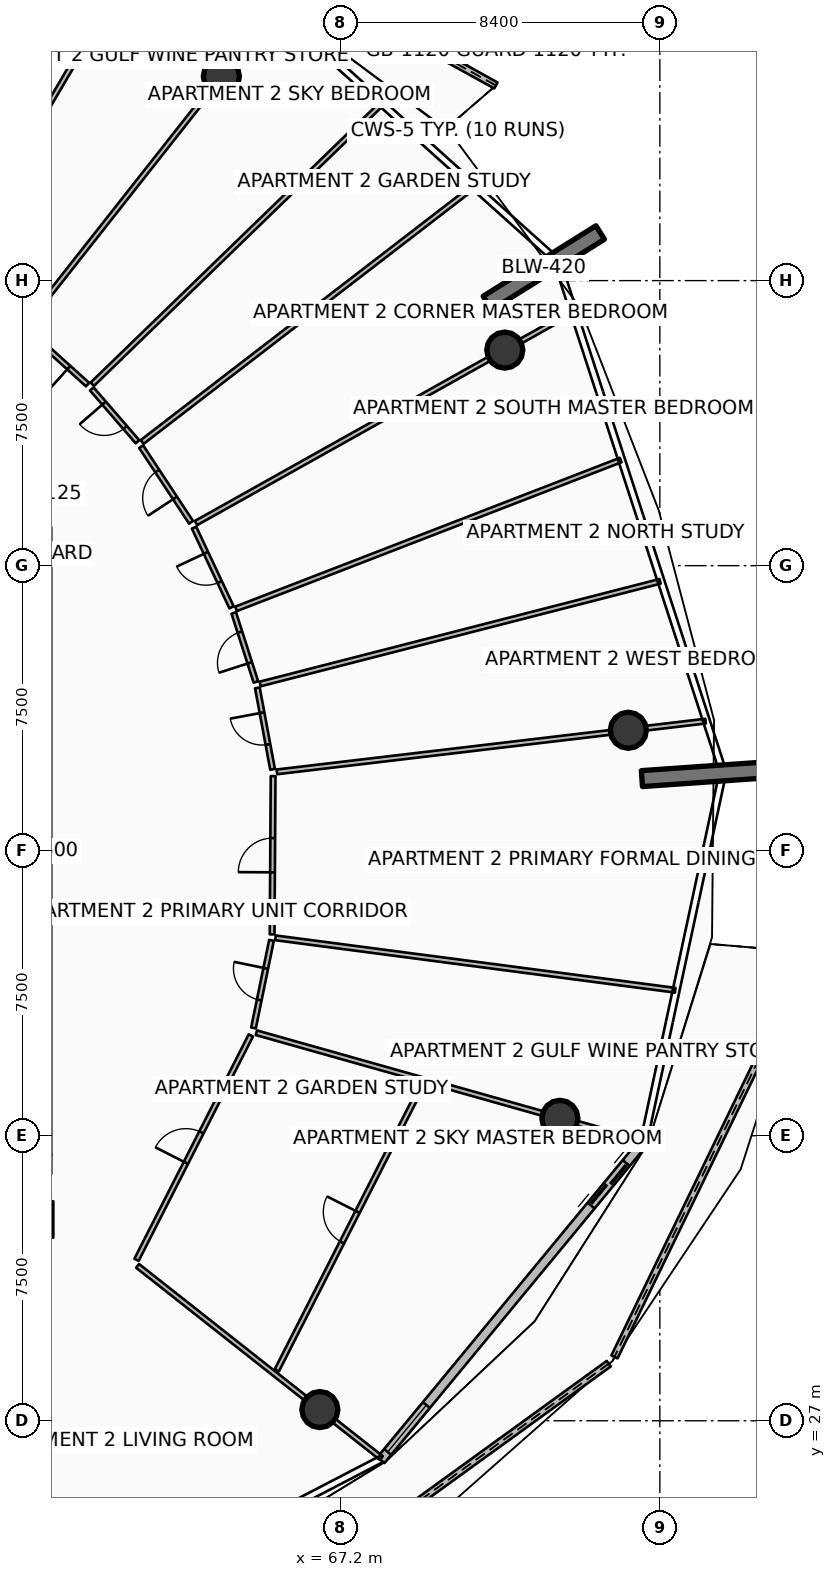
"""IFC4 building model, lengths in metres.
Left out: names, types, materials, properties, quantities, classifications, styles, units other than length and angle.
Written with IfcOpenShell. Run it as: python <this file> out.ifc"""

import sys

from ifc_helpers import new_model, si_unit, direction, frame, frame_2d, origin, origin_2d, place, context, subcontext, project, spatial, polyline, rectangle, circle, outline, extrude, element, fill, save


model = new_model("IFC4")
c1 = context("Model", 3, precision=1e-05, world=origin(), true_north=direction((0.0, 1.0)))
c2 = subcontext(c1, "Body", "Model", "MODEL_VIEW")
j1 = project(units=[si_unit("LENGTHUNIT", "METRE"), si_unit("PLANEANGLEUNIT", "RADIAN")], contexts=[c1])
p1 = place(None, origin())
s1 = spatial("IfcSite", under=j1, at=p1, CompositionType="ELEMENT")
p2 = place(p1, origin())
s2 = spatial("IfcBuilding", under=s1, at=p2, CompositionType="ELEMENT")
p3 = place(p2, frame((0.0, 0.0, 306.0)))
s3 = spatial("IfcBuildingStorey", under=s2, at=p3, CompositionType="ELEMENT", Elevation=306.0)
for number, where, z_axis, x_axis in (
    (1, (71.062, 56.411, 0.0), (0.0, 0.0, 1.0), (0.848, 0.53, 0.0)),
    (2, (75.128, 43.897, 0.0), (0.0, 0.0, 1.0), (0.998, 0.07, 0.0)),
):
    element("IfcWall", number, at=place(p3, frame(where, z_axis=z_axis, x_axis=x_axis)), inside=s3, PredefinedType="SOLIDWALL", context=c2, shape_type="SweptSolid", body=[
        extrude(rectangle(XDim=3.5, YDim=0.42, at=frame_2d((1.75, 0.0))), origin(), (0.0, 0.0, 1.0), 3.85),
    ])
p4 = place(p3, frame((71.52, 55.172, 0.0), z_axis=(-0.310266678736, -0.173751985726, 0.934636204907), x_axis=(0.488609032596, -0.872502844274, 0.0)))
e3 = element("IfcColumn", 3, at=p4, inside=s3, PredefinedType="COLUMN", context=c2, shape_type="SweptSolid", body=[
    extrude(circle(Radius=0.475, at=origin_2d()), origin(), (0.0, 0.0, 1.0), 3.691),
])
p5 = place(p3, frame((64.062, 62.374, 0.0), z_axis=(-0.212903289351, -0.270116064673, 0.938993876971), x_axis=(0.785372123188, -0.619023931782, 0.0)))
e4 = element("IfcColumn", 4, at=p5, inside=s3, PredefinedType="COLUMN", context=c2, shape_type="SweptSolid", body=[
    extrude(circle(Radius=0.475, at=origin_2d()), origin(), (0.0, 0.0, 1.0), 3.674),
])
p6 = place(p3, frame((66.654, 27.295, 0.0), z_axis=(-0.249725028878, 0.196787616792, 0.948109721408), x_axis=(-0.618939298338, -0.785438823189, 0.0)))
e5 = element("IfcColumn", 5, at=p6, inside=s3, PredefinedType="COLUMN", context=c2, shape_type="SweptSolid", body=[
    extrude(circle(Radius=0.475, at=origin_2d()), origin(), (0.0, 0.0, 1.0), 3.639),
])
p7 = place(p3, frame((72.97, 34.958, 0.0), z_axis=(-0.330987533093, 0.093362273438, 0.939005185734), x_axis=(-0.271478522348, -0.96244449809, 0.0)))
e6 = element("IfcColumn", 6, at=p7, inside=s3, PredefinedType="COLUMN", context=c2, shape_type="SweptSolid", body=[
    extrude(circle(Radius=0.475, at=origin_2d()), origin(), (0.0, 0.0, 1.0), 3.674),
])
p8 = place(p3, frame((74.77, 45.168, 0.0), z_axis=(-0.353185583697, -0.041800241366, 0.934619004349), x_axis=(0.117531776266, -0.993069122251, 0.0)))
e7 = element("IfcColumn", 7, at=p8, inside=s3, PredefinedType="COLUMN", context=c2, shape_type="SweptSolid", body=[
    extrude(circle(Radius=0.475, at=origin_2d()), origin(), (0.0, 0.0, 1.0), 3.691),
])
p9 = place(p3, frame((71.286, 62.135, 0.0), z_axis=(0.0, 0.0, 1.0), x_axis=(-0.87546271408, 0.483285667339, 0.0)))
e8 = element("IfcWall", 8, at=p9, inside=s3, PredefinedType="PARAPET", context=c2, shape_type="SweptSolid", body=[
    extrude(outline(polyline([(0.0, 0.0), (11.493, 0.0), (11.493, 1.148), (5.747, 1.127), (0.0, 1.224), (0.0, 0.0)])), frame((0.0, 0.09, 0.0), z_axis=(0.0, -1.0, 0.0), x_axis=(1.0, 0.0, 0.0)), (0.0, 0.0, 1.0), 0.18),
])
p10 = place(p3, frame((65.286, 22.009, 0.0), z_axis=(0.0, 0.0, 1.0), x_axis=(0.810034567594, 0.586382127374, 0.0)))
e9 = element("IfcWall", 9, at=p10, inside=s3, PredefinedType="PARAPET", context=c2, shape_type="SweptSolid", body=[
    extrude(outline(polyline([(0.0, 0.0), (11.073, 0.0), (11.073, 1.632), (5.537, 1.418), (0.0, 1.233), (0.0, 0.0)])), frame((0.0, 0.09, 0.0), z_axis=(0.0, -1.0, 0.0), x_axis=(1.0, 0.0, 0.0)), (0.0, 0.0, 1.0), 0.18),
])
p11 = place(p3, frame((74.406, 28.68, 0.0), z_axis=(0.0, 0.0, 1.0), x_axis=(0.436271986989, 0.899814843936, 0.0)))
e10 = element("IfcWall", 10, at=p11, inside=s3, PredefinedType="PARAPET", context=c2, shape_type="SweptSolid", body=[
    extrude(outline(polyline([(0.0, 0.0), (11.826, 0.0), (11.826, 1.86), (5.913, 1.798), (0.0, 1.632), (0.0, 0.0)])), frame((0.0, 0.09, 0.0), z_axis=(0.0, -1.0, 0.0), x_axis=(1.0, 0.0, 0.0)), (0.0, 0.0, 1.0), 0.18),
])
p12 = place(p3, frame((68.26, 25.964, 0.0), z_axis=(0.0, 0.0, 1.0), x_axis=(0.636725835274, 0.771090274024, 0.0)))
e11 = element("IfcWall", 11, at=p12, inside=s3, PredefinedType="SOLIDWALL", context=c2, shape_type="SweptSolid", body=[
    extrude(rectangle(XDim=10.907, YDim=0.24, at=frame_2d((5.454, 0.0))), origin(), (0.0, 0.0, 1.0), 2.4),
])
p13 = place(p12, frame((8.687, 0.0, 0.0)))
e12 = element("IfcOpeningElement", 12, at=p13, cuts=e11, PredefinedType="OPENING", context=c2, shape_type="SweptSolid", body=[
    extrude(rectangle(XDim=1.45, YDim=2.15, at=frame_2d((0.725, 1.075))), frame((0.0, 0.13, 0.0), z_axis=(0.0, -1.0, 0.0), x_axis=(1.0, 0.0, 0.0)), (0.0, 0.0, 1.0), 0.26),
])
p14 = place(p12, frame((0.28, 0.0, 0.65)))
e13 = element("IfcOpeningElement", 13, at=p14, cuts=e11, PredefinedType="OPENING", context=c2, shape_type="SweptSolid", body=[
    extrude(rectangle(XDim=1.6, YDim=1.5, at=frame_2d((0.8, 0.75))), frame((0.0, 0.13, 0.0), z_axis=(0.0, -1.0, 0.0), x_axis=(1.0, 0.0, 0.0)), (0.0, 0.0, 1.0), 0.26),
])
p15 = place(p3, frame((59.55, 31.82, 0.0), z_axis=(0.0, 0.0, 1.0), x_axis=(0.0, 1.0, 0.0)))
e14 = element("IfcWall", 14, at=p15, inside=s3, PredefinedType="PARTITIONING", context=c2, shape_type="SweptSolid", body=[
    extrude(rectangle(XDim=0.955, YDim=0.18, at=frame_2d((0.477, 0.0))), origin(), (0.0, 0.0, 1.0), 2.407),
])
p16 = place(p3, frame((61.858, 31.075, 0.0), z_axis=(0.0, 0.0, 1.0), x_axis=(0.785321699218, -0.619087900655, 0.0)))
e15 = element("IfcWall", 15, at=p16, inside=s3, PredefinedType="PARTITIONING", context=c2, shape_type="SweptSolid", body=[
    extrude(rectangle(XDim=8.169, YDim=0.125, at=frame_2d((4.084, 0.0))), origin(), (0.0, 0.0, 1.0), 2.407),
])
p17 = place(p3, frame((61.829, 31.235, 0.0), z_axis=(0.0, 0.0, 1.0), x_axis=(0.453994771894, 0.891004347404, 0.0)))
e16 = element("IfcWall", 16, at=p17, inside=s3, PredefinedType="PARTITIONING", context=c2, shape_type="SweptSolid", body=[
    extrude(rectangle(XDim=6.626, YDim=0.125, at=frame_2d((3.313, 0.0))), origin(), (0.0, 0.0, 1.0), 2.407),
])
p18 = place(p17, frame((2.863, 0.0, 0.0)))
e17 = element("IfcOpeningElement", 17, at=p18, cuts=e16, PredefinedType="OPENING", context=c2, shape_type="SweptSolid", body=[
    extrude(rectangle(XDim=0.9, YDim=2.08, at=frame_2d((0.45, 1.04))), frame((0.0, 0.073, 0.0), z_axis=(0.0, -1.0, 0.0), x_axis=(1.0, 0.0, 0.0)), (0.0, 0.0, 1.0), 0.145),
])
p19 = place(p3, frame((65.52, 28.326, 0.0), z_axis=(0.0, 0.0, 1.0), x_axis=(0.453999703912, 0.891001834368, 0.0)))
e18 = element("IfcWall", 18, at=p19, inside=s3, PredefinedType="PARTITIONING", context=c2, shape_type="SweptSolid", body=[
    extrude(rectangle(XDim=8.46, YDim=0.125, at=frame_2d((4.23, 0.0))), origin(), (0.0, 0.0, 1.0), 2.407),
])
p20 = place(p19, frame((3.78, 0.0, 0.0)))
e19 = element("IfcOpeningElement", 19, at=p20, cuts=e18, PredefinedType="OPENING", context=c2, shape_type="SweptSolid", body=[
    extrude(rectangle(XDim=0.9, YDim=2.08, at=frame_2d((0.45, 1.04))), frame((0.0, 0.073, 0.0), z_axis=(0.0, -1.0, 0.0), x_axis=(1.0, 0.0, 0.0)), (0.0, 0.0, 1.0), 0.145),
])
p21 = place(p3, frame((64.983, 37.21, 0.0), z_axis=(0.0, 0.0, 1.0), x_axis=(0.962454365365, -0.271443538495, 0.0)))
e20 = element("IfcWall", 20, at=p21, inside=s3, PredefinedType="PARTITIONING", context=c2, shape_type="SweptSolid", body=[
    extrude(rectangle(XDim=10.463, YDim=0.125, at=frame_2d((5.231, 0.0))), origin(), (0.0, 0.0, 1.0), 2.407),
])
p22 = place(p3, frame((65.486, 39.707, 0.0), z_axis=(0.0, 0.0, 1.0), x_axis=(0.991512400403, -0.130012152686, 0.0)))
e21 = element("IfcWall", 21, at=p22, inside=s3, PredefinedType="PARTITIONING", context=c2, shape_type="SweptSolid", body=[
    extrude(rectangle(XDim=10.608, YDim=0.125, at=frame_2d((5.304, 0.0))), origin(), (0.0, 0.0, 1.0), 2.425),
])
p23 = place(p3, frame((64.907, 37.335, 0.0), z_axis=(0.0, 0.0, 1.0), x_axis=(0.201360200042, 0.979517263676, 0.0)))
e22 = element("IfcWall", 22, at=p23, inside=s3, PredefinedType="PARTITIONING", context=c2, shape_type="SweptSolid", body=[
    extrude(rectangle(XDim=2.353, YDim=0.125, at=frame_2d((1.177, 0.0))), origin(), (0.0, 0.0, 1.0), 2.407),
])
p24 = place(p23, frame((0.752, 0.0, 0.0)))
e23 = element("IfcOpeningElement", 23, at=p24, cuts=e22, PredefinedType="OPENING", context=c2, shape_type="SweptSolid", body=[
    extrude(rectangle(XDim=0.85, YDim=2.06, at=frame_2d((0.425, 1.03))), frame((0.0, 0.073, 0.0), z_axis=(0.0, -1.0, 0.0), x_axis=(1.0, 0.0, 0.0)), (0.0, 0.0, 1.0), 0.145),
])
p25 = place(p3, frame((65.398, 39.799, 0.0), z_axis=(0.0, 0.0, 1.0), x_axis=(0.006274064384, 0.999980317864, 0.0)))
e24 = element("IfcWall", 24, at=p25, inside=s3, PredefinedType="PARTITIONING", context=c2, shape_type="SweptSolid", body=[
    extrude(rectangle(XDim=4.164, YDim=0.125, at=frame_2d((2.082, 0.0))), origin(), (0.0, 0.0, 1.0), 2.407),
])
p26 = place(p25, frame((1.632, 0.0, 0.0)))
e25 = element("IfcOpeningElement", 25, at=p26, cuts=e24, PredefinedType="OPENING", context=c2, shape_type="SweptSolid", body=[
    extrude(rectangle(XDim=0.9, YDim=2.08, at=frame_2d((0.45, 1.04))), frame((0.0, 0.073, 0.0), z_axis=(0.0, -1.0, 0.0), x_axis=(1.0, 0.0, 0.0)), (0.0, 0.0, 1.0), 0.145),
])
p27 = place(p3, frame((65.524, 44.074, 0.0), z_axis=(0.0, 0.0, 1.0), x_axis=(0.993068783977, 0.117534634433, 0.0)))
e26 = element("IfcWall", 26, at=p27, inside=s3, PredefinedType="PARTITIONING", context=c2, shape_type="SweptSolid", body=[
    extrude(rectangle(XDim=11.358, YDim=0.125, at=frame_2d((5.679, 0.0))), origin(), (0.0, 0.0, 1.0), 2.407),
])
p28 = place(p3, frame((65.082, 46.386, 0.0), z_axis=(0.0, 0.0, 1.0), x_axis=(0.968583288046, 0.248689392855, 0.0)))
e27 = element("IfcWall", 27, at=p28, inside=s3, PredefinedType="PARTITIONING", context=c2, shape_type="SweptSolid", body=[
    extrude(rectangle(XDim=10.866, YDim=0.125, at=frame_2d((5.433, 0.0))), origin(), (0.0, 0.0, 1.0), 2.425),
])
p29 = place(p3, frame((64.448, 48.363, 0.0), z_axis=(0.0, 0.0, 1.0), x_axis=(0.932639410658, 0.360809824822, 0.0)))
e28 = element("IfcWall", 28, at=p29, inside=s3, PredefinedType="PARTITIONING", context=c2, shape_type="SweptSolid", body=[
    extrude(rectangle(XDim=10.854, YDim=0.125, at=frame_2d((5.427, 0.0))), origin(), (0.0, 0.0, 1.0), 2.425),
])
p30 = place(p3, frame((65.41, 44.141, 0.0), z_axis=(0.0, 0.0, 1.0), x_axis=(-0.183463941639, 0.983026440193, 0.0)))
e29 = element("IfcWall", 29, at=p30, inside=s3, PredefinedType="PARTITIONING", context=c2, shape_type="SweptSolid", body=[
    extrude(rectangle(XDim=2.181, YDim=0.125, at=frame_2d((1.091, 0.0))), origin(), (0.0, 0.0, 1.0), 2.407),
])
p31 = place(p30, frame((0.666, 0.0, 0.0)))
e30 = element("IfcOpeningElement", 30, at=p31, cuts=e29, PredefinedType="OPENING", context=c2, shape_type="SweptSolid", body=[
    extrude(rectangle(XDim=0.85, YDim=2.06, at=frame_2d((0.425, 1.03))), frame((0.0, 0.073, 0.0), z_axis=(0.0, -1.0, 0.0), x_axis=(1.0, 0.0, 0.0)), (0.0, 0.0, 1.0), 0.145),
])
p32 = place(p3, frame((64.97, 46.44, 0.0), z_axis=(0.0, 0.0, 1.0), x_axis=(-0.305370578234, 0.952233590013, 0.0)))
e31 = element("IfcWall", 31, at=p32, inside=s3, PredefinedType="PARTITIONING", context=c2, shape_type="SweptSolid", body=[
    extrude(rectangle(XDim=1.906, YDim=0.125, at=frame_2d((0.953, 0.0))), origin(), (0.0, 0.0, 1.0), 2.89),
])
p33 = place(p32, frame((0.528, 0.0, 0.0)))
e32 = element("IfcOpeningElement", 32, at=p33, cuts=e31, PredefinedType="OPENING", context=c2, shape_type="SweptSolid", body=[
    extrude(rectangle(XDim=0.85, YDim=2.06, at=frame_2d((0.425, 1.03))), frame((0.0, 0.073, 0.0), z_axis=(0.0, -1.0, 0.0), x_axis=(1.0, 0.0, 0.0)), (0.0, 0.0, 1.0), 0.145),
])
p34 = place(p3, frame((64.33, 48.403, 0.0), z_axis=(0.0, 0.0, 1.0), x_axis=(-0.425771678031, 0.904830635084, 0.0)))
e33 = element("IfcWall", 33, at=p34, inside=s3, PredefinedType="PARTITIONING", context=c2, shape_type="SweptSolid", body=[
    extrude(rectangle(XDim=2.318, YDim=0.125, at=frame_2d((1.159, 0.0))), origin(), (0.0, 0.0, 1.0), 2.407),
])
p35 = place(p34, frame((0.734, 0.0, 0.0)))
e34 = element("IfcOpeningElement", 34, at=p35, cuts=e33, PredefinedType="OPENING", context=c2, shape_type="SweptSolid", body=[
    extrude(rectangle(XDim=0.85, YDim=2.06, at=frame_2d((0.425, 1.03))), frame((0.0, 0.073, 0.0), z_axis=(0.0, -1.0, 0.0), x_axis=(1.0, 0.0, 0.0)), (0.0, 0.0, 1.0), 0.145),
])
p36 = place(p3, frame((63.396, 50.622, 0.0), z_axis=(0.0, 0.0, 1.0), x_axis=(0.8724964858, 0.488620386667, 0.0)))
e35 = element("IfcWall", 35, at=p36, inside=s3, PredefinedType="PARTITIONING", context=c2, shape_type="SweptSolid", body=[
    extrude(rectangle(XDim=11.358, YDim=0.125, at=frame_2d((5.679, 0.0))), origin(), (0.0, 0.0, 1.0), 2.407),
])
p37 = place(p3, frame((61.978, 52.754, 0.0), z_axis=(0.0, 0.0, 1.0), x_axis=(0.792557966204, 0.609796581005, 0.0)))
e36 = element("IfcWall", 36, at=p37, inside=s3, PredefinedType="PARTITIONING", context=c2, shape_type="SweptSolid", body=[
    extrude(rectangle(XDim=10.998, YDim=0.125, at=frame_2d((5.499, 0.0))), origin(), (0.0, 0.0, 1.0), 2.425),
])
p38 = place(p3, frame((60.665, 54.273, 0.0), z_axis=(0.0, 0.0, 1.0), x_axis=(0.718137190606, 0.695901555874, 0.0)))
e37 = element("IfcWall", 37, at=p38, inside=s3, PredefinedType="PARTITIONING", context=c2, shape_type="SweptSolid", body=[
    extrude(rectangle(XDim=10.584, YDim=0.125, at=frame_2d((5.292, 0.0))), origin(), (0.0, 0.0, 1.0), 2.425),
])
p39 = place(p3, frame((63.265, 50.64, 0.0), z_axis=(0.0, 0.0, 1.0), x_axis=(-0.550634170063, 0.834746674602, 0.0)))
e38 = element("IfcWall", 38, at=p39, inside=s3, PredefinedType="PARTITIONING", context=c2, shape_type="SweptSolid", body=[
    extrude(rectangle(XDim=2.387, YDim=0.125, at=frame_2d((1.194, 0.0))), origin(), (0.0, 0.0, 1.0), 2.407),
])
p40 = place(p39, frame((0.769, 0.0, 0.0)))
e39 = element("IfcOpeningElement", 39, at=p40, cuts=e38, PredefinedType="OPENING", context=c2, shape_type="SweptSolid", body=[
    extrude(rectangle(XDim=0.85, YDim=2.06, at=frame_2d((0.425, 1.03))), frame((0.0, 0.073, 0.0), z_axis=(0.0, -1.0, 0.0), x_axis=(1.0, 0.0, 0.0)), (0.0, 0.0, 1.0), 0.145),
])
p41 = place(p3, frame((61.854, 52.76, 0.0), z_axis=(0.0, 0.0, 1.0), x_axis=(-0.653948493608, 0.756539072162, 0.0)))
e40 = element("IfcWall", 40, at=p41, inside=s3, PredefinedType="PARTITIONING", context=c2, shape_type="SweptSolid", body=[
    extrude(rectangle(XDim=1.837, YDim=0.125, at=frame_2d((0.918, 0.0))), origin(), (0.0, 0.0, 1.0), 2.89),
])
p42 = place(p41, frame((0.494, 0.0, 0.0)))
e41 = element("IfcOpeningElement", 41, at=p42, cuts=e40, PredefinedType="OPENING", context=c2, shape_type="SweptSolid", body=[
    extrude(rectangle(XDim=0.85, YDim=2.06, at=frame_2d((0.425, 1.03))), frame((0.0, 0.073, 0.0), z_axis=(0.0, -1.0, 0.0), x_axis=(1.0, 0.0, 0.0)), (0.0, 0.0, 1.0), 0.145),
])
p43 = place(p3, frame((60.541, 54.264, 0.0), z_axis=(0.0, 0.0, 1.0), x_axis=(-0.742235558018, 0.670139072443, 0.0)))
e42 = element("IfcWall", 42, at=p43, inside=s3, PredefinedType="PARTITIONING", context=c2, shape_type="SweptSolid", body=[
    extrude(rectangle(XDim=2.181, YDim=0.125, at=frame_2d((1.09, 0.0))), origin(), (0.0, 0.0, 1.0), 2.407),
])
p44 = place(p43, frame((0.666, 0.0, 0.0)))
e43 = element("IfcOpeningElement", 43, at=p44, cuts=e42, PredefinedType="OPENING", context=c2, shape_type="SweptSolid", body=[
    extrude(rectangle(XDim=0.85, YDim=2.06, at=frame_2d((0.425, 1.03))), frame((0.0, 0.073, 0.0), z_axis=(0.0, -1.0, 0.0), x_axis=(1.0, 0.0, 0.0)), (0.0, 0.0, 1.0), 0.145),
])
p45 = place(p3, frame((58.925, 55.858, 0.0), z_axis=(0.0, 0.0, 1.0), x_axis=(0.619089572631, 0.785320381157, 0.0)))
e44 = element("IfcWall", 44, at=p45, inside=s3, PredefinedType="PARTITIONING", context=c2, shape_type="SweptSolid", body=[
    extrude(rectangle(XDim=10.563, YDim=0.125, at=frame_2d((5.281, 0.0))), origin(), (0.0, 0.0, 1.0), 2.407),
])
p46 = place(p3, frame((56.93, 57.208, 0.0), z_axis=(0.0, 0.0, 1.0), x_axis=(0.506357005421, 0.862323943226, 0.0)))
e45 = element("IfcWall", 45, at=p46, inside=s3, PredefinedType="PARTITIONING", context=c2, shape_type="SweptSolid", body=[
    extrude(rectangle(XDim=9.109, YDim=0.125, at=frame_2d((4.554, 0.0))), origin(), (0.0, 0.0, 1.0), 2.425),
])
p47 = place(p13, origin())
e46 = element("IfcDoor", 46, at=p47, inside=s3, OperationType="DOUBLE_DOOR_SLIDING", PredefinedType="DOOR", context=c2, shape_type="SweptSolid", body=[
    extrude(rectangle(XDim=1.45, YDim=2.15, at=frame_2d((0.725, 1.075))), frame((0.0, 0.025, 0.0), z_axis=(0.0, -1.0, 0.0), x_axis=(1.0, 0.0, 0.0)), (0.0, 0.0, 1.0), 0.05),
])
fill(e12, e46)
p48 = place(p14, origin())
e47 = element("IfcWindow", 47, at=p48, inside=s3, PartitioningType="SINGLE_PANEL", PredefinedType="WINDOW", context=c2, shape_type="SweptSolid", body=[
    extrude(rectangle(XDim=1.6, YDim=1.5, at=frame_2d((0.8, 0.75))), frame((0.0, 0.03, 0.0), z_axis=(0.0, -1.0, 0.0), x_axis=(1.0, 0.0, 0.0)), (0.0, 0.0, 1.0), 0.06),
])
fill(e13, e47)
p49 = place(p18, origin())
e48 = element("IfcDoor", 48, at=p49, inside=s3, OperationType="SINGLE_SWING_LEFT", PredefinedType="DOOR", context=c2, shape_type="SweptSolid", body=[
    extrude(rectangle(XDim=0.9, YDim=2.08, at=frame_2d((0.45, 1.04))), frame((0.0, 0.025, 0.0), z_axis=(0.0, -1.0, 0.0), x_axis=(1.0, 0.0, 0.0)), (0.0, 0.0, 1.0), 0.05),
])
fill(e17, e48)
p50 = place(p20, origin())
e49 = element("IfcDoor", 49, at=p50, inside=s3, OperationType="SINGLE_SWING_RIGHT", PredefinedType="DOOR", context=c2, shape_type="SweptSolid", body=[
    extrude(rectangle(XDim=0.9, YDim=2.08, at=frame_2d((0.45, 1.04))), frame((0.0, 0.025, 0.0), z_axis=(0.0, -1.0, 0.0), x_axis=(1.0, 0.0, 0.0)), (0.0, 0.0, 1.0), 0.05),
])
fill(e19, e49)
p51 = place(p24, origin())
e50 = element("IfcDoor", 50, at=p51, inside=s3, OperationType="SINGLE_SWING_RIGHT", PredefinedType="DOOR", context=c2, shape_type="SweptSolid", body=[
    extrude(rectangle(XDim=0.85, YDim=2.06, at=frame_2d((0.425, 1.03))), frame((0.0, 0.025, 0.0), z_axis=(0.0, -1.0, 0.0), x_axis=(1.0, 0.0, 0.0)), (0.0, 0.0, 1.0), 0.05),
])
fill(e23, e50)
p52 = place(p26, origin())
e51 = element("IfcDoor", 51, at=p52, inside=s3, OperationType="SINGLE_SWING_LEFT", PredefinedType="DOOR", context=c2, shape_type="SweptSolid", body=[
    extrude(rectangle(XDim=0.9, YDim=2.08, at=frame_2d((0.45, 1.04))), frame((0.0, 0.025, 0.0), z_axis=(0.0, -1.0, 0.0), x_axis=(1.0, 0.0, 0.0)), (0.0, 0.0, 1.0), 0.05),
])
fill(e25, e51)
p53 = place(p31, origin())
e52 = element("IfcDoor", 52, at=p53, inside=s3, OperationType="SINGLE_SWING_RIGHT", PredefinedType="DOOR", context=c2, shape_type="SweptSolid", body=[
    extrude(rectangle(XDim=0.85, YDim=2.06, at=frame_2d((0.425, 1.03))), frame((0.0, 0.025, 0.0), z_axis=(0.0, -1.0, 0.0), x_axis=(1.0, 0.0, 0.0)), (0.0, 0.0, 1.0), 0.05),
])
fill(e30, e52)
p54 = place(p33, origin())
e53 = element("IfcDoor", 53, at=p54, inside=s3, OperationType="SINGLE_SWING_LEFT", PredefinedType="DOOR", context=c2, shape_type="SweptSolid", body=[
    extrude(rectangle(XDim=0.85, YDim=2.06, at=frame_2d((0.425, 1.03))), frame((0.0, 0.025, 0.0), z_axis=(0.0, -1.0, 0.0), x_axis=(1.0, 0.0, 0.0)), (0.0, 0.0, 1.0), 0.05),
])
fill(e32, e53)
p55 = place(p35, origin())
e54 = element("IfcDoor", 54, at=p55, inside=s3, OperationType="SINGLE_SWING_RIGHT", PredefinedType="DOOR", context=c2, shape_type="SweptSolid", body=[
    extrude(rectangle(XDim=0.85, YDim=2.06, at=frame_2d((0.425, 1.03))), frame((0.0, 0.025, 0.0), z_axis=(0.0, -1.0, 0.0), x_axis=(1.0, 0.0, 0.0)), (0.0, 0.0, 1.0), 0.05),
])
fill(e34, e54)
p56 = place(p40, origin())
e55 = element("IfcDoor", 55, at=p56, inside=s3, OperationType="SINGLE_SWING_LEFT", PredefinedType="DOOR", context=c2, shape_type="SweptSolid", body=[
    extrude(rectangle(XDim=0.85, YDim=2.06, at=frame_2d((0.425, 1.03))), frame((0.0, 0.025, 0.0), z_axis=(0.0, -1.0, 0.0), x_axis=(1.0, 0.0, 0.0)), (0.0, 0.0, 1.0), 0.05),
])
fill(e39, e55)
p57 = place(p42, origin())
e56 = element("IfcDoor", 56, at=p57, inside=s3, OperationType="SINGLE_SWING_RIGHT", PredefinedType="DOOR", context=c2, shape_type="SweptSolid", body=[
    extrude(rectangle(XDim=0.85, YDim=2.06, at=frame_2d((0.425, 1.03))), frame((0.0, 0.025, 0.0), z_axis=(0.0, -1.0, 0.0), x_axis=(1.0, 0.0, 0.0)), (0.0, 0.0, 1.0), 0.05),
])
fill(e41, e56)
p58 = place(p44, origin())
e57 = element("IfcDoor", 57, at=p58, inside=s3, OperationType="SINGLE_SWING_LEFT", PredefinedType="DOOR", context=c2, shape_type="SweptSolid", body=[
    extrude(rectangle(XDim=0.85, YDim=2.06, at=frame_2d((0.425, 1.03))), frame((0.0, 0.025, 0.0), z_axis=(0.0, -1.0, 0.0), x_axis=(1.0, 0.0, 0.0)), (0.0, 0.0, 1.0), 0.05),
])
fill(e43, e57)
save(model, sys.argv[1])
